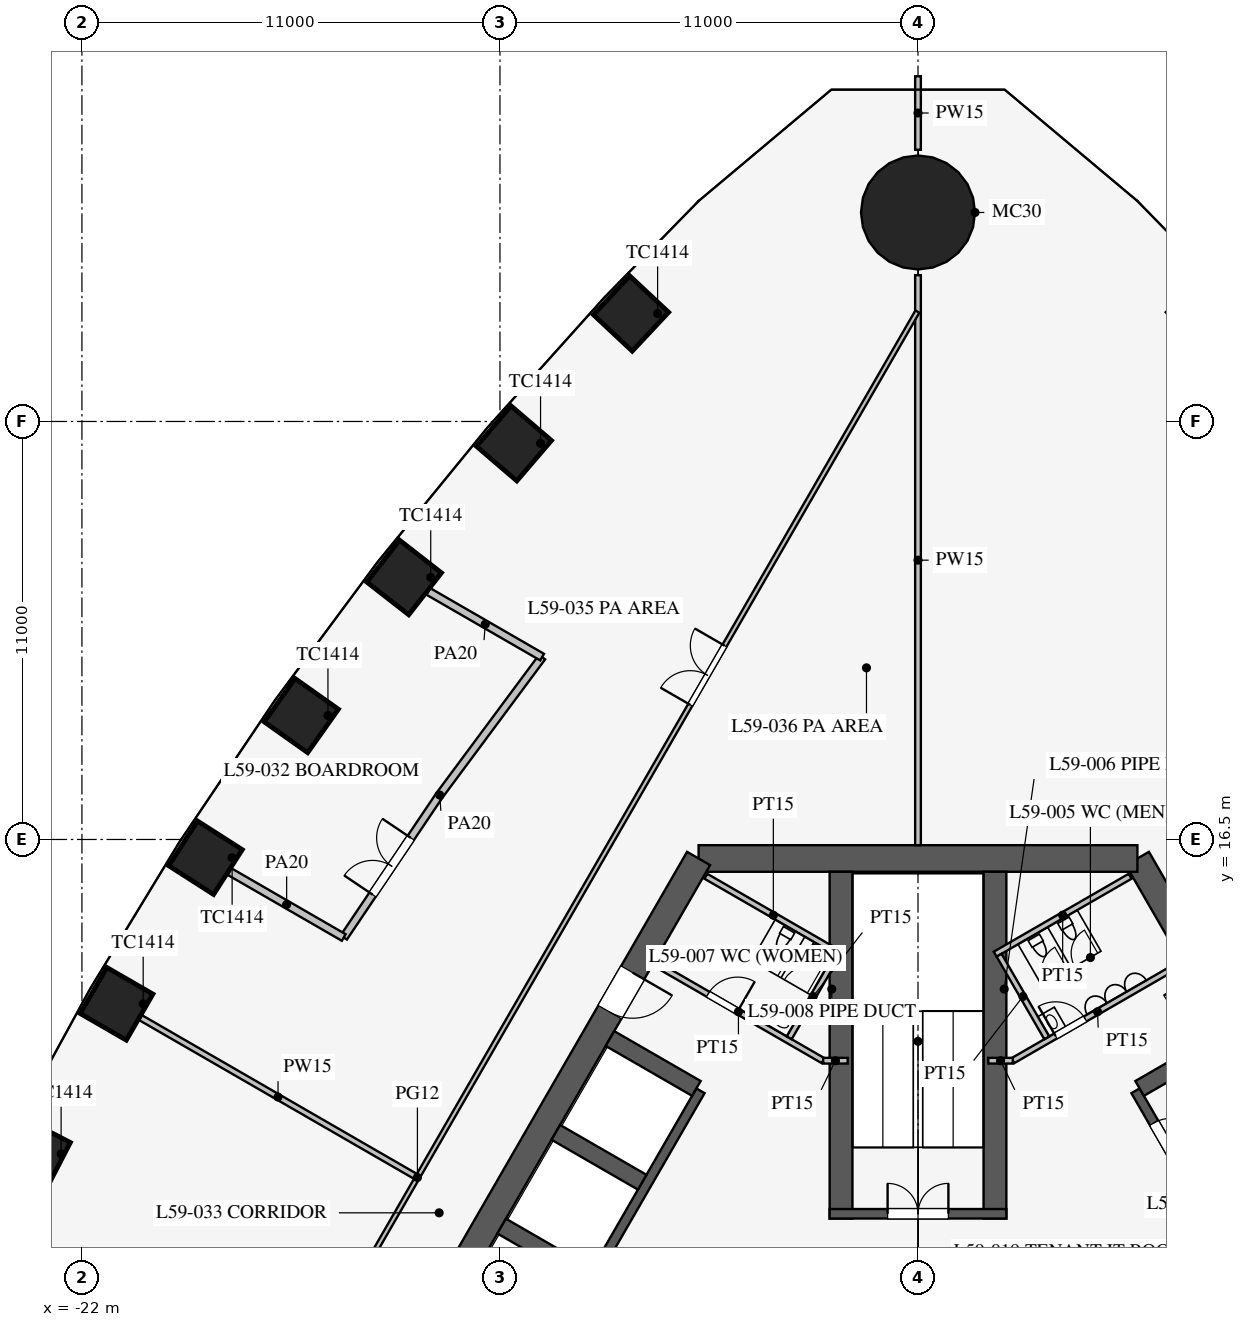
"""IFC4 building model, lengths in metres.
Left out: names, types, materials, properties, quantities, classifications, styles, units other than length and angle.
Written with IfcOpenShell. Run it as: python <this file> out.ifc"""

import sys

from ifc_helpers import new_model, si_unit, direction, frame, frame_2d, origin, origin_2d, place, context, subcontext, project, spatial, rectangle, circle, extrude, element, fill, save


model = new_model("IFC4")
c1 = context("Model", 3, precision=1e-05, world=origin(), true_north=direction((0.0, 1.0)))
c2 = subcontext(c1, "Body", "Model", "MODEL_VIEW")
j1 = project(units=[si_unit("LENGTHUNIT", "METRE"), si_unit("PLANEANGLEUNIT", "RADIAN")], contexts=[c1])
p1 = place(None, origin())
s1 = spatial("IfcSite", under=j1, at=p1, CompositionType="ELEMENT")
p2 = place(p1, origin())
s2 = spatial("IfcBuilding", under=s1, at=p2, CompositionType="ELEMENT")
p3 = place(p2, frame((0.0, 0.0, 256.9)))
s3 = spatial("IfcBuildingStorey", under=s2, at=p3, CompositionType="ELEMENT", Elevation=256.9)
for number, where, z_axis, x_axis in (
    (1, (-7.552, 30.341, 0.0), (0.0, 0.0, 1.0), (-0.684, -0.73, 0.0)),
    (2, (-10.632, 26.923, 0.0), (0.0, 0.0, 1.0), (-0.651, -0.759, 0.0)),
    (3, (-13.522, 23.396, 0.0), (0.0, 0.0, 1.0), (-0.615, -0.789, 0.0)),
    (4, (-16.227, 19.761, 0.0), (0.0, 0.0, 1.0), (-0.577, -0.816, 0.0)),
    (5, (-18.748, 16.02, 0.0), (0.0, 0.0, 1.0), (-0.539, -0.842, 0.0)),
    (6, (-21.088, 12.175, 0.0), (0.0, 0.0, 1.0), (-0.5, -0.866, 0.0)),
    (7, (-23.248, 8.226, 0.0), (0.0, 0.0, 1.0), (-0.46, -0.888, 0.0)),
):
    element("IfcColumn", number, at=place(p3, frame(where, z_axis=z_axis, x_axis=x_axis)), inside=s3, PredefinedType="COLUMN", context=c2, shape_type="SweptSolid", body=[
        extrude(rectangle(XDim=1.4, YDim=1.4, at=origin_2d()), origin(), (0.0, 0.0, 1.0), 4.2),
    ])
p4 = place(p3, frame((0.0, 33.0, 0.0), z_axis=(0.0, 0.0, 1.0), x_axis=(1.0, 0.0, 0.0)))
e8 = element("IfcColumn", 8, at=p4, inside=s3, PredefinedType="COLUMN", context=c2, shape_type="SweptSolid", body=[
    extrude(circle(Radius=1.5, at=origin_2d()), origin(), (0.0, 0.0, 1.0), 4.2),
])
p5 = place(p3, frame((16.743, -3.0, 0.0), z_axis=(0.0, 0.0, 1.0), x_axis=(-0.500002442456, 0.866023993627, 0.0)))
e9 = element("IfcWall", 9, at=p5, inside=s3, PredefinedType="SHEAR", context=c2, shape_type="SweptSolid", body=[
    extrude(rectangle(XDim=21.939, YDim=0.7, at=frame_2d((10.97, 0.0))), origin(), (0.0, 0.0, 1.0), 4.2),
])
p6 = place(p5, frame((17.27, 0.0, 0.0)))
e10 = element("IfcOpeningElement", 10, at=p6, cuts=e9, PredefinedType="OPENING", context=c2, shape_type="SweptSolid", body=[
    extrude(rectangle(XDim=1.2, YDim=2.1, at=frame_2d((0.6, 1.05))), frame((0.0, 0.36, 0.0), z_axis=(0.0, -1.0, 0.0), x_axis=(1.0, 0.0, 0.0)), (0.0, 0.0, 1.0), 0.72),
])
p7 = place(p5, frame((3.47, 0.0, 0.0)))
e11 = element("IfcOpeningElement", 11, at=p7, cuts=e9, PredefinedType="OPENING", context=c2, shape_type="SweptSolid", body=[
    extrude(rectangle(XDim=1.2, YDim=2.1, at=frame_2d((0.6, 1.05))), frame((0.0, 0.36, 0.0), z_axis=(0.0, -1.0, 0.0), x_axis=(1.0, 0.0, 0.0)), (0.0, 0.0, 1.0), 0.72),
])
p8 = place(p3, frame((5.773, 16.0, 0.0), z_axis=(0.0, 0.0, 1.0), x_axis=(-1.0, 0.0, 0.0)))
e12 = element("IfcWall", 12, at=p8, inside=s3, PredefinedType="SHEAR", context=c2, shape_type="SweptSolid", body=[
    extrude(rectangle(XDim=11.547, YDim=0.7, at=frame_2d((5.773, 0.0))), origin(), (0.0, 0.0, 1.0), 4.2),
])
p9 = place(p3, frame((-5.773, 16.0, 0.0), z_axis=(0.0, 0.0, 1.0), x_axis=(-0.500002442456, -0.866023993627, 0.0)))
e13 = element("IfcWall", 13, at=p9, inside=s3, PredefinedType="SHEAR", context=c2, shape_type="SweptSolid", body=[
    extrude(rectangle(XDim=21.939, YDim=0.7, at=frame_2d((10.97, 0.0))), origin(), (0.0, 0.0, 1.0), 4.2),
])
p10 = place(p9, frame((17.27, 0.0, 0.0)))
e14 = element("IfcOpeningElement", 14, at=p10, cuts=e13, PredefinedType="OPENING", context=c2, shape_type="SweptSolid", body=[
    extrude(rectangle(XDim=1.2, YDim=2.1, at=frame_2d((0.6, 1.05))), frame((0.0, 0.36, 0.0), z_axis=(0.0, -1.0, 0.0), x_axis=(1.0, 0.0, 0.0)), (0.0, 0.0, 1.0), 0.72),
])
p11 = place(p9, frame((3.47, 0.0, 0.0)))
e15 = element("IfcOpeningElement", 15, at=p11, cuts=e13, PredefinedType="OPENING", context=c2, shape_type="SweptSolid", body=[
    extrude(rectangle(XDim=1.2, YDim=2.1, at=frame_2d((0.6, 1.05))), frame((0.0, 0.36, 0.0), z_axis=(0.0, -1.0, 0.0), x_axis=(1.0, 0.0, 0.0)), (0.0, 0.0, 1.0), 0.72),
])
p12 = place(p3, frame((11.424, 0.014, 0.0), z_axis=(0.0, 0.0, 1.0), x_axis=(-0.500001763848, 0.866024385424, 0.0)))
e16 = element("IfcWall", 16, at=p12, inside=s3, PredefinedType="SHEAR", context=c2, shape_type="SweptSolid", body=[
    extrude(rectangle(XDim=11.4, YDim=0.25, at=frame_2d((5.7, 0.0))), origin(), (0.0, 0.0, 1.0), 4.2),
])
p13 = place(p12, frame((0.975, 0.0, 0.0)))
e17 = element("IfcOpeningElement", 17, at=p13, cuts=e16, PredefinedType="OPENING", context=c2, shape_type="SweptSolid", body=[
    extrude(rectangle(XDim=0.9, YDim=2.1, at=frame_2d((0.45, 1.05))), frame((0.0, 0.135, 0.0), z_axis=(0.0, -1.0, 0.0), x_axis=(1.0, 0.0, 0.0)), (0.0, 0.0, 1.0), 0.27),
])
p14 = place(p12, frame((3.825, 0.0, 0.0)))
e18 = element("IfcOpeningElement", 18, at=p14, cuts=e16, PredefinedType="OPENING", context=c2, shape_type="SweptSolid", body=[
    extrude(rectangle(XDim=0.9, YDim=2.1, at=frame_2d((0.45, 1.05))), frame((0.0, 0.135, 0.0), z_axis=(0.0, -1.0, 0.0), x_axis=(1.0, 0.0, 0.0)), (0.0, 0.0, 1.0), 0.27),
])
p15 = place(p12, frame((6.675, 0.0, 0.0)))
e19 = element("IfcOpeningElement", 19, at=p15, cuts=e16, PredefinedType="OPENING", context=c2, shape_type="SweptSolid", body=[
    extrude(rectangle(XDim=0.9, YDim=2.1, at=frame_2d((0.45, 1.05))), frame((0.0, 0.135, 0.0), z_axis=(0.0, -1.0, 0.0), x_axis=(1.0, 0.0, 0.0)), (0.0, 0.0, 1.0), 0.27),
])
p16 = place(p12, frame((9.525, 0.0, 0.0)))
e20 = element("IfcOpeningElement", 20, at=p16, cuts=e16, PredefinedType="OPENING", context=c2, shape_type="SweptSolid", body=[
    extrude(rectangle(XDim=0.9, YDim=2.1, at=frame_2d((0.45, 1.05))), frame((0.0, 0.135, 0.0), z_axis=(0.0, -1.0, 0.0), x_axis=(1.0, 0.0, 0.0)), (0.0, 0.0, 1.0), 0.27),
])
p17 = place(p3, frame((5.832, 9.949, 0.0), z_axis=(0.0, 0.0, 1.0), x_axis=(0.866036909293, 0.499980071345, 0.0)))
e21 = element("IfcWall", 21, at=p17, inside=s3, PredefinedType="SHEAR", context=c2, shape_type="SweptSolid", body=[
    extrude(rectangle(XDim=2.625, YDim=0.45, at=frame_2d((1.312, 0.0))), origin(), (0.0, 0.0, 1.0), 4.2),
])
p18 = place(p3, frame((-5.724, 9.886, 0.0), z_axis=(0.0, 0.0, 1.0), x_axis=(-0.500001763848, -0.866024385424, 0.0)))
e22 = element("IfcWall", 22, at=p18, inside=s3, PredefinedType="SHEAR", context=c2, shape_type="SweptSolid", body=[
    extrude(rectangle(XDim=11.4, YDim=0.25, at=frame_2d((5.7, 0.0))), origin(), (0.0, 0.0, 1.0), 4.2),
])
p19 = place(p18, frame((6.525, 0.0, 0.0)))
e23 = element("IfcOpeningElement", 23, at=p19, cuts=e22, PredefinedType="OPENING", context=c2, shape_type="SweptSolid", body=[
    extrude(rectangle(XDim=1.2, YDim=2.2, at=frame_2d((0.6, 1.1))), frame((0.0, 0.135, 0.0), z_axis=(0.0, -1.0, 0.0), x_axis=(1.0, 0.0, 0.0)), (0.0, 0.0, 1.0), 0.27),
])
p20 = place(p18, frame((9.375, 0.0, 0.0)))
e24 = element("IfcOpeningElement", 24, at=p20, cuts=e22, PredefinedType="OPENING", context=c2, shape_type="SweptSolid", body=[
    extrude(rectangle(XDim=1.2, YDim=2.2, at=frame_2d((0.6, 1.1))), frame((0.0, 0.135, 0.0), z_axis=(0.0, -1.0, 0.0), x_axis=(1.0, 0.0, 0.0)), (0.0, 0.0, 1.0), 0.27),
])
for number, where, z_axis, x_axis in (
    (25, (-5.832, 9.949, 0.0), (0.0, 0.0, 1.0), (-0.866, 0.5, 0.0)),
    (26, (-7.257, 7.481, 0.0), (0.0, 0.0, 1.0), (-0.866, 0.5, 0.0)),
    (27, (-8.682, 5.012, 0.0), (0.0, 0.0, 1.0), (-0.866, 0.5, 0.0)),
):
    element("IfcWall", number, at=place(p3, frame(where, z_axis=z_axis, x_axis=x_axis)), inside=s3, PredefinedType="SHEAR", context=c2, shape_type="SweptSolid", body=[
        extrude(rectangle(XDim=2.625, YDim=0.45, at=frame_2d((1.312, 0.0))), origin(), (0.0, 0.0, 1.0), 4.2),
    ])
for number, where, z_axis, x_axis in (
    (28, (2.025, 6.525, 0.0), (0.0, 0.0, 1.0), (0.0, 1.0, 0.0)),
    (29, (-2.025, 6.525, 0.0), (0.0, 0.0, 1.0), (0.0, 1.0, 0.0)),
):
    element("IfcWall", number, at=place(p3, frame(where, z_axis=z_axis, x_axis=x_axis)), inside=s3, PredefinedType="SHEAR", context=c2, shape_type="SweptSolid", body=[
        extrude(rectangle(XDim=9.125, YDim=0.6, at=frame_2d((4.562, 0.0))), origin(), (0.0, 0.0, 1.0), 4.2),
    ])
p21 = place(p3, frame((2.325, 6.65, 0.0), z_axis=(0.0, 0.0, 1.0), x_axis=(-1.0, 0.0, 0.0)))
e30 = element("IfcWall", 30, at=p21, inside=s3, PredefinedType="SHEAR", context=c2, shape_type="SweptSolid", body=[
    extrude(rectangle(XDim=4.65, YDim=0.25, at=frame_2d((2.325, 0.0))), origin(), (0.0, 0.0, 1.0), 4.2),
])
p22 = place(p21, frame((1.525, 0.0, 0.0)))
e31 = element("IfcOpeningElement", 31, at=p22, cuts=e30, PredefinedType="OPENING", context=c2, shape_type="SweptSolid", body=[
    extrude(rectangle(XDim=1.6, YDim=2.1, at=frame_2d((0.8, 1.05))), frame((0.0, 0.135, 0.0), z_axis=(0.0, -1.0, 0.0), x_axis=(1.0, 0.0, 0.0)), (0.0, 0.0, 1.0), 0.27),
])
p23 = place(p3, frame((2.495, 10.678, 0.0), z_axis=(0.0, 0.0, 1.0), x_axis=(0.866037967349, 0.499978238636, 0.0)))
e32 = element("IfcWall", 32, at=p23, inside=s3, PredefinedType="PARTITIONING", context=c2, shape_type="SweptSolid", body=[
    extrude(rectangle(XDim=5.15, YDim=0.15, at=frame_2d((2.575, 0.0))), origin(), (0.0, 0.0, 1.0), 4.0),
])
p24 = place(p23, frame((1.3, 0.0, 0.0)))
e33 = element("IfcOpeningElement", 33, at=p24, cuts=e32, PredefinedType="OPENING", context=c2, shape_type="SweptSolid", body=[
    extrude(rectangle(XDim=0.9, YDim=2.1, at=frame_2d((0.45, 1.05))), frame((0.0, 0.085, 0.0), z_axis=(0.0, -1.0, 0.0), x_axis=(1.0, 0.0, 0.0)), (0.0, 0.0, 1.0), 0.17),
])
p25 = place(p3, frame((-2.495, 10.678, 0.0), z_axis=(0.0, 0.0, 1.0), x_axis=(-0.866037967349, 0.499978238636, 0.0)))
e34 = element("IfcWall", 34, at=p25, inside=s3, PredefinedType="PARTITIONING", context=c2, shape_type="SweptSolid", body=[
    extrude(rectangle(XDim=5.15, YDim=0.15, at=frame_2d((2.575, 0.0))), origin(), (0.0, 0.0, 1.0), 4.0),
])
p26 = place(p25, frame((2.6, 0.0, 0.0)))
e35 = element("IfcOpeningElement", 35, at=p26, cuts=e34, PredefinedType="OPENING", context=c2, shape_type="SweptSolid", body=[
    extrude(rectangle(XDim=0.9, YDim=2.1, at=frame_2d((0.45, 1.05))), frame((0.0, 0.085, 0.0), z_axis=(0.0, -1.0, 0.0), x_axis=(1.0, 0.0, 0.0)), (0.0, 0.0, 1.0), 0.17),
])
for number, where, z_axis, x_axis in (
    (36, (2.495, 10.678, 0.0), (0.0, 0.0, 1.0), (-1.0, 0.0, 0.0)),
    (37, (-2.495, 10.678, 0.0), (0.0, 0.0, 1.0), (1.0, 0.0, 0.0)),
):
    element("IfcWall", number, at=place(p3, frame(where, z_axis=z_axis, x_axis=x_axis)), inside=s3, PredefinedType="PARTITIONING", context=c2, shape_type="SweptSolid", body=[
        extrude(rectangle(XDim=0.645, YDim=0.15, at=frame_2d((0.323, 0.0))), origin(), (0.0, 0.0, 1.0), 4.0),
    ])
p27 = place(p3, frame((2.031, 13.482, 0.0), z_axis=(0.0, 0.0, 1.0), x_axis=(0.866050731258, 0.499956128963, 0.0)))
e38 = element("IfcWall", 38, at=p27, inside=s3, PredefinedType="PARTITIONING", context=c2, shape_type="SweptSolid", body=[
    extrude(rectangle(XDim=4.1, YDim=0.15, at=frame_2d((2.05, 0.0))), origin(), (0.0, 0.0, 1.0), 4.0),
])
p28 = place(p3, frame((3.389, 11.281, 0.0), z_axis=(0.0, 0.0, 1.0), x_axis=(-0.499989096993, 0.866031698547, 0.0)))
e39 = element("IfcWall", 39, at=p28, inside=s3, PredefinedType="PARTITIONING", context=c2, shape_type="SweptSolid", body=[
    extrude(rectangle(XDim=2.51, YDim=0.15, at=frame_2d((1.255, 0.0))), origin(), (0.0, 0.0, 1.0), 4.0),
])
p29 = place(p3, frame((-2.031, 13.482, 0.0), z_axis=(0.0, 0.0, 1.0), x_axis=(-0.866050731258, 0.499956128963, 0.0)))
e40 = element("IfcWall", 40, at=p29, inside=s3, PredefinedType="PARTITIONING", context=c2, shape_type="SweptSolid", body=[
    extrude(rectangle(XDim=4.1, YDim=0.15, at=frame_2d((2.05, 0.0))), origin(), (0.0, 0.0, 1.0), 4.0),
])
p30 = place(p3, frame((-3.389, 11.281, 0.0), z_axis=(0.0, 0.0, 1.0), x_axis=(0.499989096993, 0.866031698547, 0.0)))
e41 = element("IfcWall", 41, at=p30, inside=s3, PredefinedType="PARTITIONING", context=c2, shape_type="SweptSolid", body=[
    extrude(rectangle(XDim=2.51, YDim=0.15, at=frame_2d((1.255, 0.0))), origin(), (0.0, 0.0, 1.0), 4.0),
])
p31 = place(p3, frame((0.0, 16.35, 0.0), z_axis=(0.0, 0.0, 1.0), x_axis=(0.0, 1.0, 0.0)))
e42 = element("IfcWall", 42, at=p31, inside=s3, PredefinedType="PARTITIONING", context=c2, shape_type="SweptSolid", body=[
    extrude(rectangle(XDim=15.0, YDim=0.15, at=frame_2d((7.5, 0.0))), origin(), (0.0, 0.0, 1.0), 2.4),
])
p32 = place(p3, frame((0.0, 34.65, 0.0), z_axis=(0.0, 0.0, 1.0), x_axis=(0.0, 1.0, 0.0)))
e43 = element("IfcWall", 43, at=p32, inside=s3, PredefinedType="PARTITIONING", context=c2, shape_type="SweptSolid", body=[
    extrude(rectangle(XDim=1.935, YDim=0.15, at=frame_2d((0.967, 0.0))), origin(), (0.0, 0.0, 1.0), 2.4),
])
p33 = place(p3, frame((-13.224, 7.635, 0.0), z_axis=(0.0, 0.0, 1.0), x_axis=(-0.866028817718, 0.499994086848, 0.0)))
e44 = element("IfcWall", 44, at=p33, inside=s3, PredefinedType="PARTITIONING", context=c2, shape_type="SweptSolid", body=[
    extrude(rectangle(XDim=8.351, YDim=0.15, at=frame_2d((4.175, 0.0))), origin(), (0.0, 0.0, 1.0), 2.6),
])
p34 = place(p3, frame((-0.016, 30.392, 0.0), z_axis=(0.0, 0.0, 1.0), x_axis=(-0.500000626146, -0.866025042278, 0.0)))
e45 = element("IfcWall", 45, at=p34, inside=s3, PredefinedType="PARTITIONING", context=c2, shape_type="SweptSolid", body=[
    extrude(rectangle(XDim=52.624, YDim=0.12, at=frame_2d((26.312, 0.0))), origin(), (0.0, 0.0, 1.0), 2.9),
])
p35 = place(p34, frame((10.15, 0.0, 0.15)))
e46 = element("IfcOpeningElement", 46, at=p35, cuts=e45, PredefinedType="OPENING", context=c2, shape_type="SweptSolid", body=[
    extrude(rectangle(XDim=1.8, YDim=2.1, at=frame_2d((0.9, 1.05))), frame((0.0, 0.07, 0.0), z_axis=(0.0, -1.0, 0.0), x_axis=(1.0, 0.0, 0.0)), (0.0, 0.0, 1.0), 0.14),
])
p36 = place(p34, frame((40.65, 0.0, 0.15)))
e47 = element("IfcOpeningElement", 47, at=p36, cuts=e45, PredefinedType="OPENING", context=c2, shape_type="SweptSolid", body=[
    extrude(rectangle(XDim=1.8, YDim=2.1, at=frame_2d((0.9, 1.05))), frame((0.0, 0.07, 0.0), z_axis=(0.0, -1.0, 0.0), x_axis=(1.0, 0.0, 0.0)), (0.0, 0.0, 1.0), 0.14),
])
p37 = place(p3, frame((-9.892, 21.299, 0.0), z_axis=(0.0, 0.0, 1.0), x_axis=(-0.596173167565, -0.802855873912, 0.0)))
e48 = element("IfcWall", 48, at=p37, inside=s3, PredefinedType="PARTITIONING", context=c2, shape_type="SweptSolid", body=[
    extrude(rectangle(XDim=4.53, YDim=0.2, at=frame_2d((2.265, 0.0))), origin(), (0.0, 0.0, 1.0), 2.9),
])
p38 = place(p3, frame((-12.592, 17.662, 0.0), z_axis=(0.0, 0.0, 1.0), x_axis=(-0.558466624917, -0.829526991034, 0.0)))
e49 = element("IfcWall", 49, at=p38, inside=s3, PredefinedType="PARTITIONING", context=c2, shape_type="SweptSolid", body=[
    extrude(rectangle(XDim=4.511, YDim=0.2, at=frame_2d((2.255, 0.0))), origin(), (0.0, 0.0, 1.0), 2.9),
])
p39 = place(p38, frame((1.35, 0.0, 0.15)))
e50 = element("IfcOpeningElement", 50, at=p39, cuts=e49, PredefinedType="OPENING", context=c2, shape_type="SweptSolid", body=[
    extrude(rectangle(XDim=1.8, YDim=2.1, at=frame_2d((0.9, 1.05))), frame((0.0, 0.11, 0.0), z_axis=(0.0, -1.0, 0.0), x_axis=(1.0, 0.0, 0.0)), (0.0, 0.0, 1.0), 0.22),
])
p40 = place(p3, frame((-9.892, 21.299, 0.0), z_axis=(0.0, 0.0, 1.0), x_axis=(-0.866012622712, 0.500022136814, 0.0)))
e51 = element("IfcWall", 51, at=p40, inside=s3, PredefinedType="PARTITIONING", context=c2, shape_type="SweptSolid", body=[
    extrude(rectangle(XDim=3.455, YDim=0.2, at=frame_2d((1.728, 0.0))), origin(), (0.0, 0.0, 1.0), 2.4),
])
p41 = place(p3, frame((-15.111, 13.921, 0.0), z_axis=(0.0, 0.0, 1.0), x_axis=(-0.866016800201, 0.500014901547, 0.0)))
e52 = element("IfcWall", 52, at=p41, inside=s3, PredefinedType="PARTITIONING", context=c2, shape_type="SweptSolid", body=[
    extrude(rectangle(XDim=3.469, YDim=0.2, at=frame_2d((1.734, 0.0))), origin(), (0.0, 0.0, 1.0), 2.6),
])
p42 = place(p24, origin())
e53 = element("IfcDoor", 53, at=p42, inside=s3, OperationType="SINGLE_SWING_LEFT", PredefinedType="DOOR", context=c2, shape_type="SweptSolid", body=[
    extrude(rectangle(XDim=0.9, YDim=2.1, at=frame_2d((0.45, 1.05))), frame((0.0, 0.025, 0.0), z_axis=(0.0, -1.0, 0.0), x_axis=(1.0, 0.0, 0.0)), (0.0, 0.0, 1.0), 0.05),
])
fill(e33, e53)
p43 = place(p26, frame((0.9, 0.0, 0.0), z_axis=(0.0, 0.0, 1.0), x_axis=(-1.0, 0.0, 0.0)))
e54 = element("IfcDoor", 54, at=p43, inside=s3, OperationType="SINGLE_SWING_RIGHT", PredefinedType="DOOR", context=c2, shape_type="SweptSolid", body=[
    extrude(rectangle(XDim=0.9, YDim=2.1, at=frame_2d((0.45, 1.05))), frame((0.0, 0.025, 0.0), z_axis=(0.0, -1.0, 0.0), x_axis=(1.0, 0.0, 0.0)), (0.0, 0.0, 1.0), 0.05),
])
fill(e35, e54)
p44 = place(p22, frame((1.6, 0.0, 0.0), z_axis=(0.0, 0.0, 1.0), x_axis=(-1.0, 0.0, 0.0)))
e55 = element("IfcDoor", 55, at=p44, inside=s3, OperationType="DOUBLE_DOOR_SINGLE_SWING", PredefinedType="DOOR", context=c2, shape_type="SweptSolid", body=[
    extrude(rectangle(XDim=1.6, YDim=2.1, at=frame_2d((0.8, 1.05))), frame((0.0, 0.025, 0.0), z_axis=(0.0, -1.0, 0.0), x_axis=(1.0, 0.0, 0.0)), (0.0, 0.0, 1.0), 0.05),
])
fill(e31, e55)
p45 = place(p11, origin())
e56 = element("IfcDoor", 56, at=p45, inside=s3, OperationType="SINGLE_SWING_LEFT", PredefinedType="DOOR", context=c2, shape_type="SweptSolid", body=[
    extrude(rectangle(XDim=1.2, YDim=2.1, at=frame_2d((0.6, 1.05))), frame((0.0, 0.025, 0.0), z_axis=(0.0, -1.0, 0.0), x_axis=(1.0, 0.0, 0.0)), (0.0, 0.0, 1.0), 0.05),
])
fill(e15, e56)
p46 = place(p16, frame((0.9, 0.0, 0.0), z_axis=(0.0, 0.0, 1.0), x_axis=(-1.0, 0.0, 0.0)))
e57 = element("IfcDoor", 57, at=p46, inside=s3, OperationType="SINGLE_SWING_RIGHT", PredefinedType="DOOR", context=c2, shape_type="SweptSolid", body=[
    extrude(rectangle(XDim=0.9, YDim=2.1, at=frame_2d((0.45, 1.05))), frame((0.0, 0.025, 0.0), z_axis=(0.0, -1.0, 0.0), x_axis=(1.0, 0.0, 0.0)), (0.0, 0.0, 1.0), 0.05),
])
fill(e20, e57)
p47 = place(p39, frame((1.8, 0.0, 0.0), z_axis=(0.0, 0.0, 1.0), x_axis=(-1.0, 0.0, 0.0)))
e58 = element("IfcDoor", 58, at=p47, inside=s3, OperationType="DOUBLE_DOOR_SINGLE_SWING", PredefinedType="DOOR", context=c2, shape_type="SweptSolid", body=[
    extrude(rectangle(XDim=1.8, YDim=2.1, at=frame_2d((0.9, 1.05))), frame((0.0, 0.025, 0.0), z_axis=(0.0, -1.0, 0.0), x_axis=(1.0, 0.0, 0.0)), (0.0, 0.0, 1.0), 0.05),
])
fill(e50, e58)
p48 = place(p35, frame((1.8, 0.0, 0.0), z_axis=(0.0, 0.0, 1.0), x_axis=(-1.0, 0.0, 0.0)))
e59 = element("IfcDoor", 59, at=p48, inside=s3, OperationType="DOUBLE_DOOR_SINGLE_SWING", PredefinedType="DOOR", context=c2, shape_type="SweptSolid", body=[
    extrude(rectangle(XDim=1.8, YDim=2.1, at=frame_2d((0.9, 1.05))), frame((0.0, 0.025, 0.0), z_axis=(0.0, -1.0, 0.0), x_axis=(1.0, 0.0, 0.0)), (0.0, 0.0, 1.0), 0.05),
])
fill(e46, e59)
save(model, sys.argv[1])
